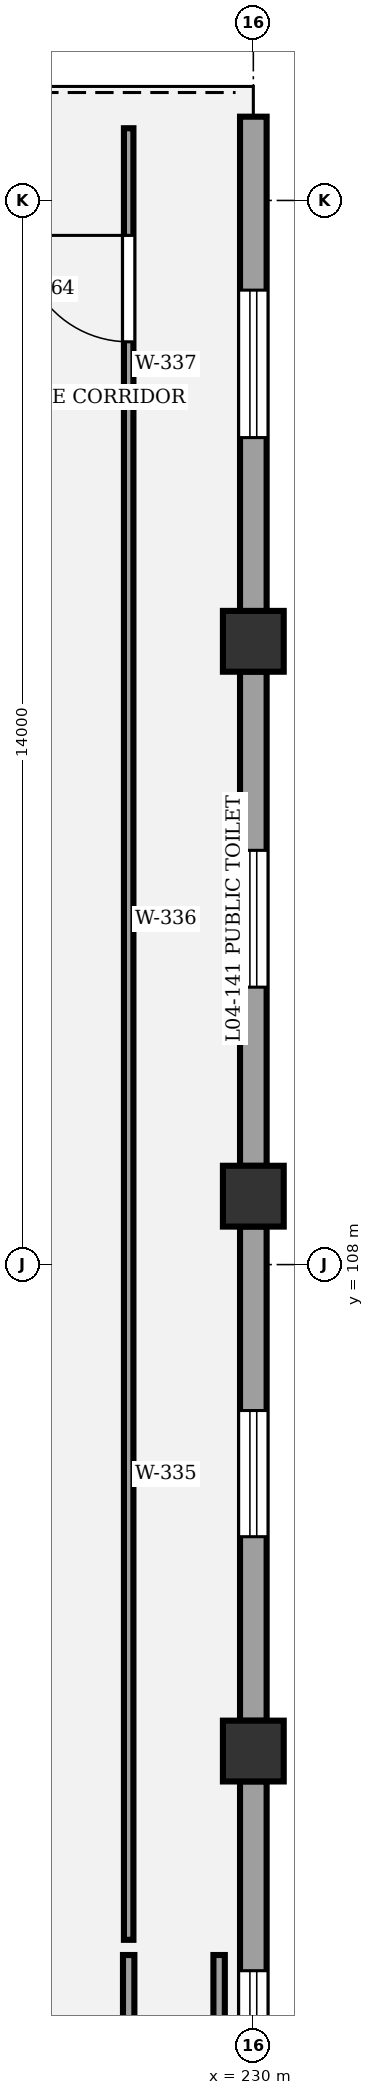
"""IFC4 building model, lengths in metres.
Left out: names, types, materials, properties, quantities, classifications, styles, units other than length and angle.
Written with IfcOpenShell. Run it as: python <this file> out.ifc"""

import sys

from ifc_helpers import new_model, si_unit, direction, frame, frame_2d, origin, origin_2d, place, context, subcontext, project, spatial, rectangle, circle, extrude, element, fill, save


model = new_model("IFC4")
c1 = context("Model", 3, precision=1e-05, world=origin(), true_north=direction((0.0, 1.0)))
c2 = subcontext(c1, "Body", "Model", "MODEL_VIEW")
j1 = project(units=[si_unit("LENGTHUNIT", "METRE"), si_unit("PLANEANGLEUNIT", "RADIAN")], contexts=[c1])
p1 = place(None, origin())
s1 = spatial("IfcSite", under=j1, at=p1, CompositionType="ELEMENT")
p2 = place(p1, origin())
s2 = spatial("IfcBuilding", under=s1, at=p2, CompositionType="ELEMENT")
p3 = place(p2, frame((0.0, 0.0, 19.2)))
s3 = spatial("IfcBuildingStorey", under=s2, at=p3, CompositionType="ELEMENT", Elevation=19.2)
for number, where, z_axis, x_axis in (
    (1, (230.0, 101.6, 0.0), (0.0, 0.0, 1.0), (1.0, 0.0, 0.0)),
    (2, (230.0, 108.9, 0.0), (0.0, 0.0, 1.0), (1.0, 0.0, 0.0)),
    (3, (230.0, 116.2, 0.0), (0.0, 0.0, 1.0), (1.0, 0.0, 0.0)),
):
    element("IfcColumn", number, at=place(p3, frame(where, z_axis=z_axis, x_axis=x_axis)), inside=s3, PredefinedType="COLUMN", context=c2, shape_type="SweptSolid", body=[
        extrude(circle(Radius=0.4, at=origin_2d()), origin(), (0.0, 0.0, 1.0), 4.8),
    ])
p4 = place(p3, frame((230.0, 101.202, 0.0), z_axis=(0.0, 0.0, 1.0), x_axis=(0.0, -1.0, 0.0)))
e4 = element("IfcWall", 4, at=p4, inside=s3, PredefinedType="STANDARD", context=c2, shape_type="SweptSolid", body=[
    extrude(rectangle(XDim=6.504, YDim=0.35, at=frame_2d((3.252, 0.0))), origin(), (0.0, 0.0, 1.0), 3.56),
])
p5 = place(p4, frame((2.492, 0.0, 0.9)))
e5 = element("IfcOpeningElement", 5, at=p5, cuts=e4, PredefinedType="OPENING", context=c2, shape_type="SweptSolid", body=[
    extrude(rectangle(XDim=1.52, YDim=1.95, at=frame_2d((0.76, 0.975))), frame((0.0, 0.185, 0.0), z_axis=(0.0, -1.0, 0.0), x_axis=(1.0, 0.0, 0.0)), (0.0, 0.0, 1.0), 0.37),
])
p6 = place(p3, frame((230.0, 108.502, 0.0), z_axis=(0.0, 0.0, 1.0), x_axis=(0.0, -1.0, 0.0)))
e6 = element("IfcWall", 6, at=p6, inside=s3, PredefinedType="STANDARD", context=c2, shape_type="SweptSolid", body=[
    extrude(rectangle(XDim=6.504, YDim=0.35, at=frame_2d((3.252, 0.0))), origin(), (0.0, 0.0, 1.0), 3.56),
])
p7 = place(p6, frame((2.422, 0.0, 0.9)))
e7 = element("IfcOpeningElement", 7, at=p7, cuts=e6, PredefinedType="OPENING", context=c2, shape_type="SweptSolid", body=[
    extrude(rectangle(XDim=1.66, YDim=1.95, at=frame_2d((0.83, 0.975))), frame((0.0, 0.185, 0.0), z_axis=(0.0, -1.0, 0.0), x_axis=(1.0, 0.0, 0.0)), (0.0, 0.0, 1.0), 0.37),
])
p8 = place(p3, frame((230.0, 115.802, 0.0), z_axis=(0.0, 0.0, 1.0), x_axis=(0.0, -1.0, 0.0)))
e8 = element("IfcWall", 8, at=p8, inside=s3, PredefinedType="STANDARD", context=c2, shape_type="SweptSolid", body=[
    extrude(rectangle(XDim=6.504, YDim=0.35, at=frame_2d((3.252, 0.0))), origin(), (0.0, 0.0, 1.0), 3.56),
])
p9 = place(p8, frame((2.352, 0.0, 0.9)))
e9 = element("IfcOpeningElement", 9, at=p9, cuts=e8, PredefinedType="OPENING", context=c2, shape_type="SweptSolid", body=[
    extrude(rectangle(XDim=1.8, YDim=1.95, at=frame_2d((0.9, 0.975))), frame((0.0, 0.185, 0.0), z_axis=(0.0, -1.0, 0.0), x_axis=(1.0, 0.0, 0.0)), (0.0, 0.0, 1.0), 0.37),
])
p10 = place(p3, frame((230.0, 123.102, 0.0), z_axis=(0.0, 0.0, 1.0), x_axis=(0.0, -1.0, 0.0)))
e10 = element("IfcWall", 10, at=p10, inside=s3, PredefinedType="STANDARD", context=c2, shape_type="SweptSolid", body=[
    extrude(rectangle(XDim=6.504, YDim=0.35, at=frame_2d((3.252, 0.0))), origin(), (0.0, 0.0, 1.0), 3.56),
])
p11 = place(p10, frame((2.282, 0.0, 0.9)))
e11 = element("IfcOpeningElement", 11, at=p11, cuts=e10, PredefinedType="OPENING", context=c2, shape_type="SweptSolid", body=[
    extrude(rectangle(XDim=1.94, YDim=1.95, at=frame_2d((0.97, 0.975))), frame((0.0, 0.185, 0.0), z_axis=(0.0, -1.0, 0.0), x_axis=(1.0, 0.0, 0.0)), (0.0, 0.0, 1.0), 0.37),
])
p12 = place(p3, frame((228.36, 75.083, 0.0), z_axis=(0.0, 0.0, 1.0), x_axis=(0.0, 1.0, 0.0)))
e12 = element("IfcWall", 12, at=p12, inside=s3, PredefinedType="PARTITIONING", context=c2, shape_type="SweptSolid", body=[
    extrude(rectangle(XDim=23.833, YDim=0.15, at=frame_2d((11.917, 0.0))), origin(), (0.0, 0.0, 1.0), 3.55),
])
p13 = place(p12, frame((7.976, 0.0, 0.0)))
e13 = element("IfcOpeningElement", 13, at=p13, cuts=e12, PredefinedType="OPENING", context=c2, shape_type="SweptSolid", body=[
    extrude(rectangle(XDim=1.32, YDim=2.2, at=frame_2d((0.66, 1.1))), frame((0.0, 0.085, 0.0), z_axis=(0.0, -1.0, 0.0), x_axis=(1.0, 0.0, 0.0)), (0.0, 0.0, 1.0), 0.17),
])
p14 = place(p3, frame((228.36, 99.117, 0.0), z_axis=(0.0, 0.0, 1.0), x_axis=(0.0, 1.0, 0.0)))
e14 = element("IfcWall", 14, at=p14, inside=s3, PredefinedType="PARTITIONING", context=c2, shape_type="SweptSolid", body=[
    extrude(rectangle(XDim=23.833, YDim=0.125, at=frame_2d((11.917, 0.0))), origin(), (0.0, 0.0, 1.0), 3.55),
])
p15 = place(p14, frame((21.024, 0.0, 0.0)))
e15 = element("IfcOpeningElement", 15, at=p15, cuts=e14, PredefinedType="OPENING", context=c2, shape_type="SweptSolid", body=[
    extrude(rectangle(XDim=1.4, YDim=2.2, at=frame_2d((0.7, 1.1))), frame((0.0, 0.073, 0.0), z_axis=(0.0, -1.0, 0.0), x_axis=(1.0, 0.0, 0.0)), (0.0, 0.0, 1.0), 0.145),
])
p16 = place(p3, frame((229.55, 98.917, 0.0), z_axis=(0.0, 0.0, 1.0), x_axis=(0.0, -1.0, 0.0)))
e16 = element("IfcWall", 16, at=p16, inside=s3, PredefinedType="PARTITIONING", context=c2, shape_type="SweptSolid", body=[
    extrude(rectangle(XDim=23.833, YDim=0.15, at=frame_2d((11.917, 0.0))), origin(), (0.0, 0.0, 1.0), 3.55),
])
p17 = place(p5, origin())
e17 = element("IfcWindow", 17, at=p17, inside=s3, PartitioningType="SINGLE_PANEL", PredefinedType="WINDOW", context=c2, shape_type="SweptSolid", body=[
    extrude(rectangle(XDim=1.52, YDim=1.95, at=frame_2d((0.76, 0.975))), frame((0.0, 0.03, 0.0), z_axis=(0.0, -1.0, 0.0), x_axis=(1.0, 0.0, 0.0)), (0.0, 0.0, 1.0), 0.06),
])
fill(e5, e17)
p18 = place(p7, origin())
e18 = element("IfcWindow", 18, at=p18, inside=s3, PartitioningType="SINGLE_PANEL", PredefinedType="WINDOW", context=c2, shape_type="SweptSolid", body=[
    extrude(rectangle(XDim=1.66, YDim=1.95, at=frame_2d((0.83, 0.975))), frame((0.0, 0.03, 0.0), z_axis=(0.0, -1.0, 0.0), x_axis=(1.0, 0.0, 0.0)), (0.0, 0.0, 1.0), 0.06),
])
fill(e7, e18)
p19 = place(p9, origin())
e19 = element("IfcWindow", 19, at=p19, inside=s3, PartitioningType="SINGLE_PANEL", PredefinedType="WINDOW", context=c2, shape_type="SweptSolid", body=[
    extrude(rectangle(XDim=1.8, YDim=1.95, at=frame_2d((0.9, 0.975))), frame((0.0, 0.03, 0.0), z_axis=(0.0, -1.0, 0.0), x_axis=(1.0, 0.0, 0.0)), (0.0, 0.0, 1.0), 0.06),
])
fill(e9, e19)
p20 = place(p11, origin())
e20 = element("IfcWindow", 20, at=p20, inside=s3, PartitioningType="SINGLE_PANEL", PredefinedType="WINDOW", context=c2, shape_type="SweptSolid", body=[
    extrude(rectangle(XDim=1.94, YDim=1.95, at=frame_2d((0.97, 0.975))), frame((0.0, 0.03, 0.0), z_axis=(0.0, -1.0, 0.0), x_axis=(1.0, 0.0, 0.0)), (0.0, 0.0, 1.0), 0.06),
])
fill(e11, e20)
p21 = place(p15, origin())
e21 = element("IfcDoor", 21, at=p21, inside=s3, OperationType="SINGLE_SWING_RIGHT", PredefinedType="DOOR", context=c2, shape_type="SweptSolid", body=[
    extrude(rectangle(XDim=1.4, YDim=2.2, at=frame_2d((0.7, 1.1))), frame((0.0, 0.025, 0.0), z_axis=(0.0, -1.0, 0.0), x_axis=(1.0, 0.0, 0.0)), (0.0, 0.0, 1.0), 0.05),
])
fill(e15, e21)
save(model, sys.argv[1])
